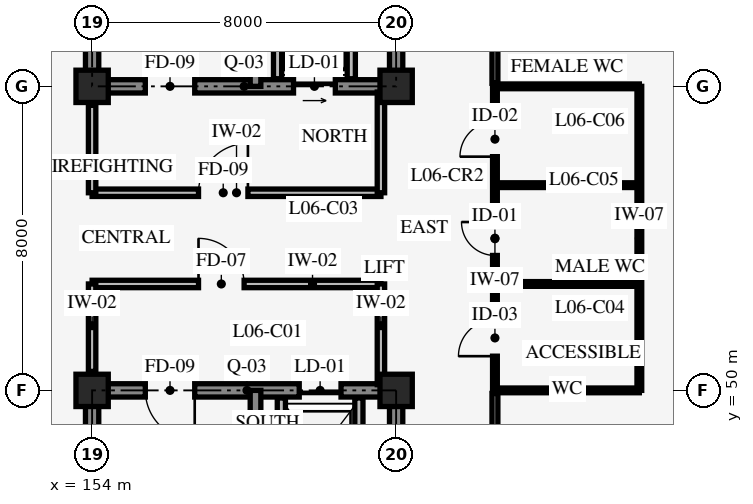
"""IFC4 building model, lengths in metres.
Left out: names, types, materials, properties, quantities, classifications, styles, units other than length and angle.
Written with IfcOpenShell. Run it as: python <this file> out.ifc"""

import sys

from ifc_helpers import new_model, si_unit, direction, frame, frame_2d, origin, origin_2d, place, context, subcontext, project, spatial, rectangle, extrude, element, fill, save


model = new_model("IFC4")
c1 = context("Model", 3, precision=1e-05, world=origin(), true_north=direction((0.0, 1.0)))
c2 = subcontext(c1, "Body", "Model", "MODEL_VIEW")
j1 = project(units=[si_unit("LENGTHUNIT", "METRE"), si_unit("PLANEANGLEUNIT", "RADIAN")], contexts=[c1])
p1 = place(None, origin())
s1 = spatial("IfcSite", under=j1, at=p1, CompositionType="ELEMENT")
p2 = place(p1, origin())
s2 = spatial("IfcBuilding", under=s1, at=p2, CompositionType="ELEMENT")
p3 = place(p2, frame((0.0, 0.0, 23.4)))
s3 = spatial("IfcBuildingStorey", under=s2, at=p3, CompositionType="ELEMENT", Elevation=23.4)
p4 = place(p3, frame((162.0, 42.0, 0.0), z_axis=(0.0, 0.0, 1.0), x_axis=(0.0, 1.0, 0.0)))
e1 = element("IfcWall", 1, at=p4, inside=s3, PredefinedType="SHEAR", context=c2, shape_type="SweptSolid", body=[
    extrude(rectangle(XDim=8.0, YDim=0.35, at=frame_2d((4.0, 0.0))), origin(), (0.0, 0.0, 1.0), 3.95),
])
p5 = place(p4, frame((3.175, 0.0, 0.0)))
e2 = element("IfcOpeningElement", 2, at=p5, cuts=e1, PredefinedType="OPENING", context=c2, shape_type="SweptSolid", body=[
    extrude(rectangle(XDim=1.05, YDim=2.2, at=frame_2d((0.525, 1.1))), frame((0.0, 0.185, 0.0), z_axis=(0.0, -1.0, 0.0), x_axis=(1.0, 0.0, 0.0)), (0.0, 0.0, 1.0), 0.37),
])
p6 = place(p3, frame((162.0, 50.0, 0.0), z_axis=(0.0, 0.0, 1.0), x_axis=(-1.0, 0.0, 0.0)))
e3 = element("IfcWall", 3, at=p6, inside=s3, PredefinedType="SHEAR", context=c2, shape_type="SweptSolid", body=[
    extrude(rectangle(XDim=8.0, YDim=0.35, at=frame_2d((4.0, 0.0))), origin(), (0.0, 0.0, 1.0), 3.95),
])
p7 = place(p6, frame((5.3, 0.0, 0.0)))
e4 = element("IfcOpeningElement", 4, at=p7, cuts=e3, PredefinedType="OPENING", context=c2, shape_type="SweptSolid", body=[
    extrude(rectangle(XDim=1.3, YDim=2.15, at=frame_2d((0.65, 1.075))), frame((0.0, 0.185, 0.0), z_axis=(0.0, -1.0, 0.0), x_axis=(1.0, 0.0, 0.0)), (0.0, 0.0, 1.0), 0.37),
])
p8 = place(p6, frame((1.45, 0.0, 0.0)))
e5 = element("IfcOpeningElement", 5, at=p8, cuts=e3, PredefinedType="OPENING", context=c2, shape_type="SweptSolid", body=[
    extrude(rectangle(XDim=1.1, YDim=2.2, at=frame_2d((0.55, 1.1))), frame((0.0, 0.185, 0.0), z_axis=(0.0, -1.0, 0.0), x_axis=(1.0, 0.0, 0.0)), (0.0, 0.0, 1.0), 0.37),
])
p9 = place(p3, frame((154.0, 50.0, 0.0), z_axis=(0.0, 0.0, 1.0), x_axis=(0.0, -1.0, 0.0)))
e6 = element("IfcWall", 6, at=p9, inside=s3, PredefinedType="SHEAR", context=c2, shape_type="SweptSolid", body=[
    extrude(rectangle(XDim=8.0, YDim=0.35, at=frame_2d((4.0, 0.0))), origin(), (0.0, 0.0, 1.0), 3.95),
])
p10 = place(p3, frame((158.3, 42.0, 0.0), z_axis=(0.0, 0.0, 1.0), x_axis=(0.0, 1.0, 0.0)))
e7 = element("IfcWall", 7, at=p10, inside=s3, PredefinedType="SHEAR", context=c2, shape_type="SweptSolid", body=[
    extrude(rectangle(XDim=8.0, YDim=0.28, at=frame_2d((4.0, 0.0))), origin(), (0.0, 0.0, 1.0), 3.95),
])
p11 = place(p3, frame((154.0, 58.0, 0.0), z_axis=(0.0, 0.0, 1.0), x_axis=(1.0, 0.0, 0.0)))
e8 = element("IfcWall", 8, at=p11, inside=s3, PredefinedType="SHEAR", context=c2, shape_type="SweptSolid", body=[
    extrude(rectangle(XDim=8.0, YDim=0.35, at=frame_2d((4.0, 0.0))), origin(), (0.0, 0.0, 1.0), 3.95),
])
p12 = place(p11, frame((1.4, 0.0, 0.0)))
e9 = element("IfcOpeningElement", 9, at=p12, cuts=e8, PredefinedType="OPENING", context=c2, shape_type="SweptSolid", body=[
    extrude(rectangle(XDim=1.3, YDim=2.15, at=frame_2d((0.65, 1.075))), frame((0.0, 0.185, 0.0), z_axis=(0.0, -1.0, 0.0), x_axis=(1.0, 0.0, 0.0)), (0.0, 0.0, 1.0), 0.37),
])
p13 = place(p11, frame((5.3, 0.0, 0.0)))
e10 = element("IfcOpeningElement", 10, at=p13, cuts=e8, PredefinedType="OPENING", context=c2, shape_type="SweptSolid", body=[
    extrude(rectangle(XDim=1.1, YDim=2.2, at=frame_2d((0.55, 1.1))), frame((0.0, 0.185, 0.0), z_axis=(0.0, -1.0, 0.0), x_axis=(1.0, 0.0, 0.0)), (0.0, 0.0, 1.0), 0.37),
])
p14 = place(p3, frame((162.0, 58.0, 0.0), z_axis=(0.0, 0.0, 1.0), x_axis=(0.0, 1.0, 0.0)))
e11 = element("IfcWall", 11, at=p14, inside=s3, PredefinedType="SHEAR", context=c2, shape_type="SweptSolid", body=[
    extrude(rectangle(XDim=8.0, YDim=0.35, at=frame_2d((4.0, 0.0))), origin(), (0.0, 0.0, 1.0), 3.95),
])
p15 = place(p14, frame((3.275, 0.0, 0.0)))
e12 = element("IfcOpeningElement", 12, at=p15, cuts=e11, PredefinedType="OPENING", context=c2, shape_type="SweptSolid", body=[
    extrude(rectangle(XDim=1.05, YDim=2.2, at=frame_2d((0.525, 1.1))), frame((0.0, 0.185, 0.0), z_axis=(0.0, -1.0, 0.0), x_axis=(1.0, 0.0, 0.0)), (0.0, 0.0, 1.0), 0.37),
])
p16 = place(p14, frame((5.45, 0.0, 0.0)))
e13 = element("IfcOpeningElement", 13, at=p16, cuts=e11, PredefinedType="OPENING", context=c2, shape_type="SweptSolid", body=[
    extrude(rectangle(XDim=1.4, YDim=2.3, at=frame_2d((0.7, 1.15))), frame((0.0, 0.185, 0.0), z_axis=(0.0, -1.0, 0.0), x_axis=(1.0, 0.0, 0.0)), (0.0, 0.0, 1.0), 0.37),
])
p17 = place(p3, frame((154.0, 66.0, 0.0), z_axis=(0.0, 0.0, 1.0), x_axis=(0.0, -1.0, 0.0)))
e14 = element("IfcWall", 14, at=p17, inside=s3, PredefinedType="SHEAR", context=c2, shape_type="SweptSolid", body=[
    extrude(rectangle(XDim=8.0, YDim=0.35, at=frame_2d((4.0, 0.0))), origin(), (0.0, 0.0, 1.0), 3.95),
])
p18 = place(p3, frame((158.3, 58.0, 0.0), z_axis=(0.0, 0.0, 1.0), x_axis=(0.0, 1.0, 0.0)))
e15 = element("IfcWall", 15, at=p18, inside=s3, PredefinedType="SHEAR", context=c2, shape_type="SweptSolid", body=[
    extrude(rectangle(XDim=8.0, YDim=0.28, at=frame_2d((4.0, 0.0))), origin(), (0.0, 0.0, 1.0), 3.95),
])
for number, where, z_axis, x_axis in (
    (16, (154.0, 50.0, 0.0), (0.0, 0.0, 1.0), (1.0, 0.0, 0.0)),
    (17, (154.0, 58.0, 0.0), (0.0, 0.0, 1.0), (1.0, 0.0, 0.0)),
    (18, (162.0, 50.0, 0.0), (0.0, 0.0, 1.0), (1.0, 0.0, 0.0)),
    (19, (162.0, 58.0, 0.0), (0.0, 0.0, 1.0), (1.0, 0.0, 0.0)),
):
    element("IfcColumn", number, at=place(p3, frame(where, z_axis=z_axis, x_axis=x_axis)), inside=s3, PredefinedType="COLUMN", context=c2, shape_type="SweptSolid", body=[
        extrude(rectangle(XDim=0.85, YDim=0.85, at=origin_2d()), origin(), (0.0, 0.0, 1.0), 4.2),
    ])
for number, where, z_axis, x_axis in (
    (20, (158.98, 47.02, 0.0), (0.0, 0.0, 1.0), (0.0, 1.0, 0.0)),
    (21, (161.02, 47.02, 0.0), (0.0, 0.0, 1.0), (0.0, 1.0, 0.0)),
):
    element("IfcWall", number, at=place(p3, frame(where, z_axis=z_axis, x_axis=x_axis)), inside=s3, PredefinedType="STANDARD", context=c2, shape_type="SweptSolid", body=[
        extrude(rectangle(XDim=2.78, YDim=0.215, at=frame_2d((1.39, 0.0))), origin(), (0.0, 0.0, 1.0), 3.9),
    ])
for number, where, z_axis, x_axis in (
    (22, (160.82, 58.2, 0.0), (0.0, 0.0, 1.0), (0.0, 1.0, 0.0)),
    (23, (158.88, 58.2, 0.0), (0.0, 0.0, 1.0), (0.0, 1.0, 0.0)),
):
    element("IfcWall", number, at=place(p3, frame(where, z_axis=z_axis, x_axis=x_axis)), inside=s3, PredefinedType="STANDARD", context=c2, shape_type="SweptSolid", body=[
        extrude(rectangle(XDim=2.55, YDim=0.215, at=frame_2d((1.275, 0.0))), origin(), (0.0, 0.0, 1.0), 3.9),
    ])
p19 = place(p3, frame((154.0, 52.8, 0.0), z_axis=(0.0, 0.0, 1.0), x_axis=(1.0, 0.0, 0.0)))
e24 = element("IfcWall", 24, at=p19, inside=s3, PredefinedType="STANDARD", context=c2, shape_type="SweptSolid", body=[
    extrude(rectangle(XDim=7.6, YDim=0.195, at=frame_2d((3.8, 0.0))), origin(), (0.0, 0.0, 1.0), 3.9),
])
p20 = place(p19, frame((2.8, 0.0, 0.0)))
e25 = element("IfcOpeningElement", 25, at=p20, cuts=e24, PredefinedType="OPENING", context=c2, shape_type="SweptSolid", body=[
    extrude(rectangle(XDim=1.2, YDim=2.1, at=frame_2d((0.6, 1.05))), frame((0.0, 0.107, 0.0), z_axis=(0.0, -1.0, 0.0), x_axis=(1.0, 0.0, 0.0)), (0.0, 0.0, 1.0), 0.215),
])
p21 = place(p3, frame((161.6, 50.15, 0.0), z_axis=(0.0, 0.0, 1.0), x_axis=(0.0, 1.0, 0.0)))
e26 = element("IfcWall", 26, at=p21, inside=s3, PredefinedType="STANDARD", context=c2, shape_type="SweptSolid", body=[
    extrude(rectangle(XDim=2.65, YDim=0.195, at=frame_2d((1.325, 0.0))), origin(), (0.0, 0.0, 1.0), 3.19),
])
p22 = place(p3, frame((154.0, 50.5, 0.0), z_axis=(0.0, 0.0, 1.0), x_axis=(0.0, 1.0, 0.0)))
e27 = element("IfcWall", 27, at=p22, inside=s3, PredefinedType="STANDARD", context=c2, shape_type="SweptSolid", body=[
    extrude(rectangle(XDim=2.3, YDim=0.195, at=frame_2d((1.15, 0.0))), origin(), (0.0, 0.0, 1.0), 3.19),
])
p23 = place(p3, frame((154.0, 55.2, 0.0), z_axis=(0.0, 0.0, 1.0), x_axis=(1.0, 0.0, 0.0)))
e28 = element("IfcWall", 28, at=p23, inside=s3, PredefinedType="STANDARD", context=c2, shape_type="SweptSolid", body=[
    extrude(rectangle(XDim=7.6, YDim=0.195, at=frame_2d((3.8, 0.0))), origin(), (0.0, 0.0, 1.0), 3.9),
])
p24 = place(p23, frame((2.8, 0.0, 0.0)))
e29 = element("IfcOpeningElement", 29, at=p24, cuts=e28, PredefinedType="OPENING", context=c2, shape_type="SweptSolid", body=[
    extrude(rectangle(XDim=1.3, YDim=2.15, at=frame_2d((0.65, 1.075))), frame((0.0, 0.107, 0.0), z_axis=(0.0, -1.0, 0.0), x_axis=(1.0, 0.0, 0.0)), (0.0, 0.0, 1.0), 0.215),
])
p25 = place(p3, frame((161.6, 55.2, 0.0), z_axis=(0.0, 0.0, 1.0), x_axis=(0.0, 1.0, 0.0)))
e30 = element("IfcWall", 30, at=p25, inside=s3, PredefinedType="STANDARD", context=c2, shape_type="SweptSolid", body=[
    extrude(rectangle(XDim=2.65, YDim=0.195, at=frame_2d((1.325, 0.0))), origin(), (0.0, 0.0, 1.0), 3.19),
])
p26 = place(p3, frame((154.0, 55.2, 0.0), z_axis=(0.0, 0.0, 1.0), x_axis=(0.0, 1.0, 0.0)))
e31 = element("IfcWall", 31, at=p26, inside=s3, PredefinedType="STANDARD", context=c2, shape_type="SweptSolid", body=[
    extrude(rectangle(XDim=2.3, YDim=0.195, at=frame_2d((1.15, 0.0))), origin(), (0.0, 0.0, 1.0), 3.19),
])
p27 = place(p3, frame((164.6, 50.0, 0.0), z_axis=(0.0, 0.0, 1.0), x_axis=(0.0, 1.0, 0.0)))
e32 = element("IfcWall", 32, at=p27, inside=s3, PredefinedType="STANDARD", context=c2, shape_type="SweptSolid", body=[
    extrude(rectangle(XDim=8.0, YDim=0.125, at=frame_2d((4.0, 0.0))), origin(), (0.0, 0.0, 1.0), 3.9),
])
p28 = place(p27, frame((0.9, 0.0, 0.0)))
e33 = element("IfcOpeningElement", 33, at=p28, cuts=e32, PredefinedType="OPENING", context=c2, shape_type="SweptSolid", body=[
    extrude(rectangle(XDim=0.96, YDim=2.08, at=frame_2d((0.48, 1.04))), frame((0.0, 0.073, 0.0), z_axis=(0.0, -1.0, 0.0), x_axis=(1.0, 0.0, 0.0)), (0.0, 0.0, 1.0), 0.145),
])
p29 = place(p27, frame((3.55, 0.0, 0.0)))
e34 = element("IfcOpeningElement", 34, at=p29, cuts=e32, PredefinedType="OPENING", context=c2, shape_type="SweptSolid", body=[
    extrude(rectangle(XDim=0.88, YDim=2.05, at=frame_2d((0.44, 1.025))), frame((0.0, 0.073, 0.0), z_axis=(0.0, -1.0, 0.0), x_axis=(1.0, 0.0, 0.0)), (0.0, 0.0, 1.0), 0.145),
])
p30 = place(p27, frame((6.15, 0.0, 0.0)))
e35 = element("IfcOpeningElement", 35, at=p30, cuts=e32, PredefinedType="OPENING", context=c2, shape_type="SweptSolid", body=[
    extrude(rectangle(XDim=0.92, YDim=2.05, at=frame_2d((0.46, 1.025))), frame((0.0, 0.073, 0.0), z_axis=(0.0, -1.0, 0.0), x_axis=(1.0, 0.0, 0.0)), (0.0, 0.0, 1.0), 0.145),
])
p31 = place(p3, frame((168.4, 50.0, 0.0), z_axis=(0.0, 0.0, 1.0), x_axis=(0.0, 1.0, 0.0)))
e36 = element("IfcWall", 36, at=p31, inside=s3, PredefinedType="STANDARD", context=c2, shape_type="SweptSolid", body=[
    extrude(rectangle(XDim=8.0, YDim=0.125, at=frame_2d((4.0, 0.0))), origin(), (0.0, 0.0, 1.0), 3.9),
])
p32 = place(p3, frame((164.6, 50.0, 0.0), z_axis=(0.0, 0.0, 1.0), x_axis=(1.0, 0.0, 0.0)))
e37 = element("IfcWall", 37, at=p32, inside=s3, PredefinedType="STANDARD", context=c2, shape_type="SweptSolid", body=[
    extrude(rectangle(XDim=3.8, YDim=0.125, at=frame_2d((1.9, 0.0))), origin(), (0.0, 0.0, 1.0), 3.14),
])
for number, where, z_axis, x_axis in (
    (38, (164.6, 52.8, 0.0), (0.0, 0.0, 1.0), (1.0, 0.0, 0.0)),
    (39, (164.6, 55.4, 0.0), (0.0, 0.0, 1.0), (1.0, 0.0, 0.0)),
):
    element("IfcWall", number, at=place(p3, frame(where, z_axis=z_axis, x_axis=x_axis)), inside=s3, PredefinedType="STANDARD", context=c2, shape_type="SweptSolid", body=[
        extrude(rectangle(XDim=3.8, YDim=0.125, at=frame_2d((1.9, 0.0))), origin(), (0.0, 0.0, 1.0), 3.9),
    ])
p33 = place(p3, frame((164.6, 58.0, 0.0), z_axis=(0.0, 0.0, 1.0), x_axis=(1.0, 0.0, 0.0)))
e40 = element("IfcWall", 40, at=p33, inside=s3, PredefinedType="STANDARD", context=c2, shape_type="SweptSolid", body=[
    extrude(rectangle(XDim=3.8, YDim=0.125, at=frame_2d((1.9, 0.0))), origin(), (0.0, 0.0, 1.0), 3.14),
])
p34 = place(p3, frame((164.6, 46.08, 0.0), z_axis=(0.0, 0.0, 1.0), x_axis=(0.0, 1.0, 0.0)))
e41 = element("IfcWall", 41, at=p34, inside=s3, PredefinedType="STANDARD", context=c2, shape_type="SweptSolid", body=[
    extrude(rectangle(XDim=3.84, YDim=0.155, at=frame_2d((1.92, 0.0))), origin(), (0.0, 0.0, 1.0), 3.9),
])
p35 = place(p34, frame((1.12, 0.0, 0.0)))
e42 = element("IfcOpeningElement", 42, at=p35, cuts=e41, PredefinedType="OPENING", context=c2, shape_type="SweptSolid", body=[
    extrude(rectangle(XDim=1.6, YDim=2.25, at=frame_2d((0.8, 1.125))), frame((0.0, 0.087, 0.0), z_axis=(0.0, -1.0, 0.0), x_axis=(1.0, 0.0, 0.0)), (0.0, 0.0, 1.0), 0.175),
])
p36 = place(p3, frame((164.6, 58.08, 0.0), z_axis=(0.0, 0.0, 1.0), x_axis=(0.0, 1.0, 0.0)))
e43 = element("IfcWall", 43, at=p36, inside=s3, PredefinedType="STANDARD", context=c2, shape_type="SweptSolid", body=[
    extrude(rectangle(XDim=7.8, YDim=0.155, at=frame_2d((3.9, 0.0))), origin(), (0.0, 0.0, 1.0), 3.9),
])
p37 = place(p36, frame((3.1, 0.0, 0.0)))
e44 = element("IfcOpeningElement", 44, at=p37, cuts=e43, PredefinedType="OPENING", context=c2, shape_type="SweptSolid", body=[
    extrude(rectangle(XDim=1.6, YDim=2.25, at=frame_2d((0.8, 1.125))), frame((0.0, 0.087, 0.0), z_axis=(0.0, -1.0, 0.0), x_axis=(1.0, 0.0, 0.0)), (0.0, 0.0, 1.0), 0.175),
])
p38 = place(p7, origin())
e45 = element("IfcDoor", 45, at=p38, inside=s3, OperationType="SINGLE_SWING_LEFT", PredefinedType="DOOR", context=c2, shape_type="SweptSolid", body=[
    extrude(rectangle(XDim=1.3, YDim=2.15, at=frame_2d((0.65, 1.075))), frame((0.0, 0.025, 0.0), z_axis=(0.0, -1.0, 0.0), x_axis=(1.0, 0.0, 0.0)), (0.0, 0.0, 1.0), 0.05),
])
fill(e4, e45)
p39 = place(p8, origin())
e46 = element("IfcDoor", 46, at=p39, inside=s3, OperationType="SLIDING_TO_LEFT", PredefinedType="DOOR", context=c2, shape_type="SweptSolid", body=[
    extrude(rectangle(XDim=1.1, YDim=2.2, at=frame_2d((0.55, 1.1))), frame((0.0, 0.025, 0.0), z_axis=(0.0, -1.0, 0.0), x_axis=(1.0, 0.0, 0.0)), (0.0, 0.0, 1.0), 0.05),
])
fill(e5, e46)
p40 = place(p12, origin())
e47 = element("IfcDoor", 47, at=p40, inside=s3, OperationType="SINGLE_SWING_RIGHT", PredefinedType="DOOR", context=c2, shape_type="SweptSolid", body=[
    extrude(rectangle(XDim=1.3, YDim=2.15, at=frame_2d((0.65, 1.075))), frame((0.0, 0.025, 0.0), z_axis=(0.0, -1.0, 0.0), x_axis=(1.0, 0.0, 0.0)), (0.0, 0.0, 1.0), 0.05),
])
fill(e9, e47)
p41 = place(p13, origin())
e48 = element("IfcDoor", 48, at=p41, inside=s3, OperationType="SLIDING_TO_RIGHT", PredefinedType="DOOR", context=c2, shape_type="SweptSolid", body=[
    extrude(rectangle(XDim=1.1, YDim=2.2, at=frame_2d((0.55, 1.1))), frame((0.0, 0.025, 0.0), z_axis=(0.0, -1.0, 0.0), x_axis=(1.0, 0.0, 0.0)), (0.0, 0.0, 1.0), 0.05),
])
fill(e10, e48)
p42 = place(p20, origin())
e49 = element("IfcDoor", 49, at=p42, inside=s3, OperationType="SINGLE_SWING_LEFT", PredefinedType="DOOR", context=c2, shape_type="SweptSolid", body=[
    extrude(rectangle(XDim=1.2, YDim=2.1, at=frame_2d((0.6, 1.05))), frame((0.0, 0.025, 0.0), z_axis=(0.0, -1.0, 0.0), x_axis=(1.0, 0.0, 0.0)), (0.0, 0.0, 1.0), 0.05),
])
fill(e25, e49)
p43 = place(p24, origin())
e50 = element("IfcDoor", 50, at=p43, inside=s3, OperationType="SINGLE_SWING_RIGHT", PredefinedType="DOOR", context=c2, shape_type="SweptSolid", body=[
    extrude(rectangle(XDim=1.3, YDim=2.15, at=frame_2d((0.65, 1.075))), frame((0.0, 0.025, 0.0), z_axis=(0.0, -1.0, 0.0), x_axis=(1.0, 0.0, 0.0)), (0.0, 0.0, 1.0), 0.05),
])
fill(e29, e50)
p44 = place(p28, origin())
e51 = element("IfcDoor", 51, at=p44, inside=s3, OperationType="SINGLE_SWING_LEFT", PredefinedType="DOOR", context=c2, shape_type="SweptSolid", body=[
    extrude(rectangle(XDim=0.96, YDim=2.08, at=frame_2d((0.48, 1.04))), frame((0.0, 0.025, 0.0), z_axis=(0.0, -1.0, 0.0), x_axis=(1.0, 0.0, 0.0)), (0.0, 0.0, 1.0), 0.05),
])
fill(e33, e51)
p45 = place(p29, origin())
e52 = element("IfcDoor", 52, at=p45, inside=s3, OperationType="SINGLE_SWING_RIGHT", PredefinedType="DOOR", context=c2, shape_type="SweptSolid", body=[
    extrude(rectangle(XDim=0.88, YDim=2.05, at=frame_2d((0.44, 1.025))), frame((0.0, 0.025, 0.0), z_axis=(0.0, -1.0, 0.0), x_axis=(1.0, 0.0, 0.0)), (0.0, 0.0, 1.0), 0.05),
])
fill(e34, e52)
p46 = place(p30, origin())
e53 = element("IfcDoor", 53, at=p46, inside=s3, OperationType="SINGLE_SWING_LEFT", PredefinedType="DOOR", context=c2, shape_type="SweptSolid", body=[
    extrude(rectangle(XDim=0.92, YDim=2.05, at=frame_2d((0.46, 1.025))), frame((0.0, 0.025, 0.0), z_axis=(0.0, -1.0, 0.0), x_axis=(1.0, 0.0, 0.0)), (0.0, 0.0, 1.0), 0.05),
])
fill(e35, e53)
save(model, sys.argv[1])
